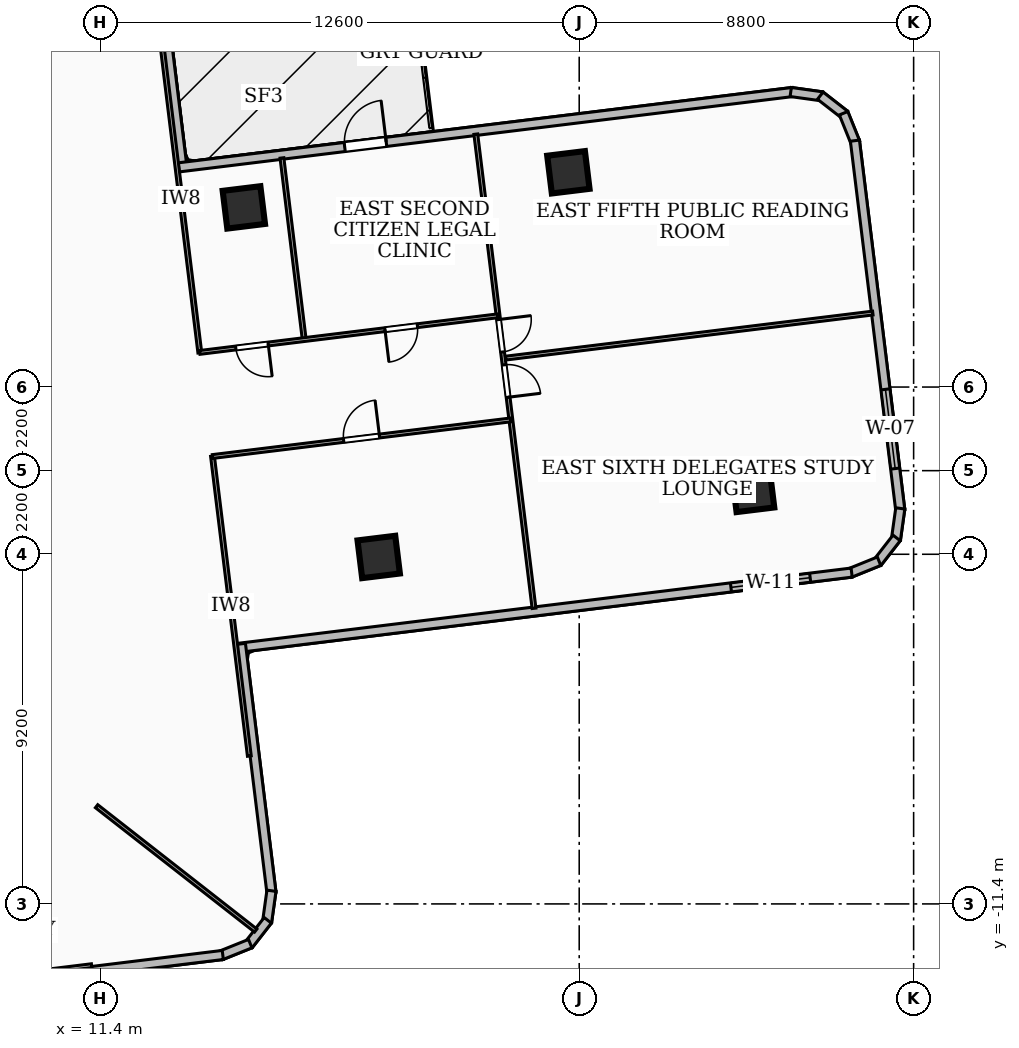
"""IFC4 building model, lengths in metres.
Left out: names, types, materials, properties, quantities, classifications, styles, units other than length and angle.
Written with IfcOpenShell. Run it as: python <this file> out.ifc"""

import sys

from ifc_helpers import new_model, si_unit, direction, frame, frame_2d, origin, origin_2d, place, context, subcontext, project, spatial, rectangle, extrude, element, fill, save


model = new_model("IFC4")
c1 = context("Model", 3, precision=1e-05, world=origin(), true_north=direction((0.0, 1.0)))
c2 = subcontext(c1, "Body", "Model", "MODEL_VIEW")
j1 = project(units=[si_unit("LENGTHUNIT", "METRE"), si_unit("PLANEANGLEUNIT", "RADIAN")], contexts=[c1])
p1 = place(None, origin())
s1 = spatial("IfcSite", under=j1, at=p1, CompositionType="ELEMENT")
p2 = place(p1, origin())
s2 = spatial("IfcBuilding", under=s1, at=p2, CompositionType="ELEMENT")
p3 = place(p2, frame((0.0, 0.0, 82.08)))
s3 = spatial("IfcBuildingStorey", under=s2, at=p3, CompositionType="ELEMENT", Elevation=82.08)
for number, where, z_axis, x_axis in (
    (1, (18.724, -2.271, 0.0), (0.0, 0.0, 1.0), (0.993, 0.122, 0.0)),
    (2, (15.175, 6.927, 0.0), (0.0, 0.0, 1.0), (0.993, 0.122, 0.0)),
    (3, (28.576, -0.533, 0.0), (0.0, 0.0, 1.0), (0.993, 0.122, 0.0)),
    (4, (23.715, 7.851, 0.0), (0.0, 0.0, 1.0), (0.993, 0.122, 0.0)),
):
    element("IfcColumn", number, at=place(p3, frame(where, z_axis=z_axis, x_axis=x_axis)), inside=s3, PredefinedType="COLUMN", context=c2, shape_type="SweptSolid", body=[
        extrude(rectangle(XDim=1.0, YDim=1.0, at=origin_2d()), origin(), (0.0, 0.0, 1.0), 3.6),
    ])
p4 = place(p3, frame((12.743, 14.621, 0.0), z_axis=(0.0, 0.0, 1.0), x_axis=(0.121949848087, -0.992536263595, 0.0)))
e5 = element("IfcWall", 5, at=p4, inside=s3, PredefinedType="SOLIDWALL", context=c2, shape_type="SweptSolid", body=[
    extrude(rectangle(XDim=6.775, YDim=0.24, at=frame_2d((3.387, 0.0))), origin(), (0.0, 0.0, 1.0), 3.34),
])
p5 = place(p3, frame((13.462, 7.98, 0.0), z_axis=(0.0, 0.0, 1.0), x_axis=(0.992550299081, 0.121835560463, 0.0)))
e6 = element("IfcWall", 6, at=p5, inside=s3, PredefinedType="SOLIDWALL", context=c2, shape_type="SweptSolid", body=[
    extrude(rectangle(XDim=16.275, YDim=0.24, at=frame_2d((8.138, 0.0))), origin(), (0.0, 0.0, 1.0), 3.34),
])
p6 = place(p5, frame((4.4, 0.0, 0.0)))
e7 = element("IfcOpeningElement", 7, at=p6, cuts=e6, PredefinedType="OPENING", context=c2, shape_type="SweptSolid", body=[
    extrude(rectangle(XDim=1.1, YDim=2.1, at=frame_2d((0.55, 1.05))), frame((0.0, 0.13, 0.0), z_axis=(0.0, -1.0, 0.0), x_axis=(1.0, 0.0, 0.0)), (0.0, 0.0, 1.0), 0.26),
])
p7 = place(p3, frame((29.566, 9.963, 0.0), z_axis=(0.0, 0.0, 1.0), x_axis=(0.990579937989, -0.136935701899, 0.0)))
e8 = element("IfcWall", 8, at=p7, inside=s3, PredefinedType="SOLIDWALL", context=c2, shape_type="SweptSolid", body=[
    extrude(rectangle(XDim=0.831, YDim=0.24, at=frame_2d((0.416, 0.0))), origin(), (0.0, 0.0, 1.0), 3.34),
])
p8 = place(p3, frame((30.344, 9.867, 0.0), z_axis=(0.0, 0.0, 1.0), x_axis=(0.788996702001, -0.614397431824, 0.0)))
e9 = element("IfcWall", 9, at=p8, inside=s3, PredefinedType="SOLIDWALL", context=c2, shape_type="SweptSolid", body=[
    extrude(rectangle(XDim=0.814, YDim=0.24, at=frame_2d((0.407, 0.0))), origin(), (0.0, 0.0, 1.0), 3.34),
])
p9 = place(p3, frame((30.957, 9.405, 0.0), z_axis=(0.0, 0.0, 1.0), x_axis=(0.373519459995, -0.927622343955, 0.0)))
e10 = element("IfcWall", 10, at=p9, inside=s3, PredefinedType="SOLIDWALL", context=c2, shape_type="SweptSolid", body=[
    extrude(rectangle(XDim=0.83, YDim=0.24, at=frame_2d((0.415, 0.0))), origin(), (0.0, 0.0, 1.0), 3.34),
])
p10 = place(p3, frame((31.255, 8.683, 0.0), z_axis=(0.0, 0.0, 1.0), x_axis=(0.12185728374, -0.992547632308, 0.0)))
e11 = element("IfcWall", 11, at=p10, inside=s3, PredefinedType="SOLIDWALL", context=c2, shape_type="SweptSolid", body=[
    extrude(rectangle(XDim=9.799, YDim=0.24, at=frame_2d((4.899, 0.0))), origin(), (0.0, 0.0, 1.0), 3.34),
])
p11 = place(p10, frame((6.593, 0.0, 0.85)))
e12 = element("IfcOpeningElement", 12, at=p11, cuts=e11, PredefinedType="OPENING", context=c2, shape_type="SweptSolid", body=[
    extrude(rectangle(XDim=2.1, YDim=1.8, at=frame_2d((1.05, 0.9))), frame((0.0, 0.13, 0.0), z_axis=(0.0, -1.0, 0.0), x_axis=(1.0, 0.0, 0.0)), (0.0, 0.0, 1.0), 0.26),
])
p12 = place(p3, frame((32.449, -0.993, 0.0), z_axis=(0.0, 0.0, 1.0), x_axis=(-0.138538220487, -0.990357087855, 0.0)))
e13 = element("IfcWall", 13, at=p12, inside=s3, PredefinedType="SOLIDWALL", context=c2, shape_type="SweptSolid", body=[
    extrude(rectangle(XDim=0.83, YDim=0.24, at=frame_2d((0.415, 0.0))), origin(), (0.0, 0.0, 1.0), 3.34),
])
p13 = place(p3, frame((32.352, -1.77, 0.0), z_axis=(0.0, 0.0, 1.0), x_axis=(-0.614397431824, -0.788996702001, 0.0)))
e14 = element("IfcWall", 14, at=p13, inside=s3, PredefinedType="SOLIDWALL", context=c2, shape_type="SweptSolid", body=[
    extrude(rectangle(XDim=0.814, YDim=0.24, at=frame_2d((0.407, 0.0))), origin(), (0.0, 0.0, 1.0), 3.34),
])
p14 = place(p3, frame((31.89, -2.383, 0.0), z_axis=(0.0, 0.0, 1.0), x_axis=(-0.927007742151, -0.375042192283, 0.0)))
e15 = element("IfcWall", 15, at=p14, inside=s3, PredefinedType="SOLIDWALL", context=c2, shape_type="SweptSolid", body=[
    extrude(rectangle(XDim=0.829, YDim=0.24, at=frame_2d((0.415, 0.0))), origin(), (0.0, 0.0, 1.0), 3.34),
])
p15 = place(p3, frame((31.169, -2.682, 0.0), z_axis=(0.0, 0.0, 1.0), x_axis=(-0.992548484973, -0.121850338438, 0.0)))
e16 = element("IfcWall", 16, at=p15, inside=s3, PredefinedType="SOLIDWALL", context=c2, shape_type="SweptSolid", body=[
    extrude(rectangle(XDim=16.275, YDim=0.24, at=frame_2d((8.138, 0.0))), origin(), (0.0, 0.0, 1.0), 3.34),
])
p16 = place(p15, frame((1.1, 0.0, 0.85)))
e17 = element("IfcOpeningElement", 17, at=p16, cuts=e16, PredefinedType="OPENING", context=c2, shape_type="SweptSolid", body=[
    extrude(rectangle(XDim=2.1, YDim=1.6, at=frame_2d((1.05, 0.8))), frame((0.0, 0.13, 0.0), z_axis=(0.0, -1.0, 0.0), x_axis=(1.0, 0.0, 0.0)), (0.0, 0.0, 1.0), 0.26),
])
p17 = place(p3, frame((15.098, -4.558, 0.0), z_axis=(0.0, 0.0, 1.0), x_axis=(0.121938646341, -0.992537639855, 0.0)))
e18 = element("IfcWall", 18, at=p17, inside=s3, PredefinedType="SOLIDWALL", context=c2, shape_type="SweptSolid", body=[
    extrude(rectangle(XDim=6.595, YDim=0.24, at=frame_2d((3.298, 0.0))), origin(), (0.0, 0.0, 1.0), 3.34),
])
p18 = place(p3, frame((15.902, -11.054, 0.0), z_axis=(0.0, 0.0, 1.0), x_axis=(-0.138376981782, -0.990379629694, 0.0)))
e19 = element("IfcWall", 19, at=p18, inside=s3, PredefinedType="SOLIDWALL", context=c2, shape_type="SweptSolid", body=[
    extrude(rectangle(XDim=0.831, YDim=0.24, at=frame_2d((0.416, 0.0))), origin(), (0.0, 0.0, 1.0), 3.34),
])
p19 = place(p3, frame((15.805, -11.832, 0.0), z_axis=(0.0, 0.0, 1.0), x_axis=(-0.614397431824, -0.788996702001, 0.0)))
e20 = element("IfcWall", 20, at=p19, inside=s3, PredefinedType="SOLIDWALL", context=c2, shape_type="SweptSolid", body=[
    extrude(rectangle(XDim=0.814, YDim=0.24, at=frame_2d((0.407, 0.0))), origin(), (0.0, 0.0, 1.0), 3.34),
])
p20 = place(p3, frame((15.343, -12.445, 0.0), z_axis=(0.0, 0.0, 1.0), x_axis=(-0.927724225254, -0.37326634174, 0.0)))
e21 = element("IfcWall", 21, at=p20, inside=s3, PredefinedType="SOLIDWALL", context=c2, shape_type="SweptSolid", body=[
    extrude(rectangle(XDim=0.83, YDim=0.24, at=frame_2d((0.415, 0.0))), origin(), (0.0, 0.0, 1.0), 3.34),
])
p21 = place(p3, frame((14.621, -12.743, 0.0), z_axis=(0.0, 0.0, 1.0), x_axis=(-0.992536263595, -0.121949848087, 0.0)))
e22 = element("IfcWall", 22, at=p21, inside=s3, PredefinedType="SOLIDWALL", context=c2, shape_type="SweptSolid", body=[
    extrude(rectangle(XDim=6.775, YDim=0.24, at=frame_2d((3.387, 0.0))), origin(), (0.0, 0.0, 1.0), 3.34),
])
p22 = place(p3, frame((8.11, 10.38, 0.0), z_axis=(0.0, 0.0, 1.0), x_axis=(0.615665236773, 0.788007814828, 0.0)))
e23 = element("IfcWall", 23, at=p22, inside=s3, PredefinedType="PARTITIONING", context=c2, shape_type="SweptSolid", body=[
    extrude(rectangle(XDim=6.482, YDim=0.1, at=frame_2d((3.241, 0.0))), origin(), (0.0, 0.0, 1.0), 3.34),
])
p23 = place(p3, frame((11.3, -8.829, 0.0), z_axis=(0.0, 0.0, 1.0), x_axis=(0.788014623364, -0.61565652223, 0.0)))
e24 = element("IfcWall", 24, at=p23, inside=s3, PredefinedType="PARTITIONING", context=c2, shape_type="SweptSolid", body=[
    extrude(rectangle(XDim=5.315, YDim=0.1, at=frame_2d((2.657, 0.0))), origin(), (0.0, 0.0, 1.0), 3.34),
])
p24 = place(p3, frame((14.017, 3.101, 0.0), z_axis=(0.0, 0.0, 1.0), x_axis=(-0.122045971517, 0.992524448483, 0.0)))
e25 = element("IfcWall", 25, at=p24, inside=s3, PredefinedType="PARTITIONING", context=c2, shape_type="SweptSolid", body=[
    extrude(rectangle(XDim=8.13, YDim=0.1, at=frame_2d((4.065, 0.0))), origin(), (0.0, 0.0, 1.0), 2.486),
])
p25 = place(p3, frame((15.32, -7.509, 0.0), z_axis=(0.0, 0.0, 1.0), x_axis=(-0.122001160868, 0.992529957607, 0.0)))
e26 = element("IfcWall", 26, at=p25, inside=s3, PredefinedType="PARTITIONING", context=c2, shape_type="SweptSolid", body=[
    extrude(rectangle(XDim=7.95, YDim=0.1, at=frame_2d((3.975, 0.0))), origin(), (0.0, 0.0, 1.0), 2.486),
])
p26 = place(p3, frame((16.762, 3.469, 0.0), z_axis=(0.0, 0.0, 1.0), x_axis=(-0.121797137196, 0.992555014783, 0.0)))
e27 = element("IfcWall", 27, at=p26, inside=s3, PredefinedType="PARTITIONING", context=c2, shape_type="SweptSolid", body=[
    extrude(rectangle(XDim=4.795, YDim=0.1, at=frame_2d((2.397, 0.0))), origin(), (0.0, 0.0, 1.0), 2.486),
])
p27 = place(p3, frame((21.866, 4.075, 0.0), z_axis=(0.0, 0.0, 1.0), x_axis=(-0.992548040298, -0.121853960542, 0.0)))
e28 = element("IfcWall", 28, at=p27, inside=s3, PredefinedType="PARTITIONING", context=c2, shape_type="SweptSolid", body=[
    extrude(rectangle(XDim=7.91, YDim=0.1, at=frame_2d((3.955, 0.0))), origin(), (0.0, 0.0, 1.0), 3.34),
])
p28 = place(p27, frame((6.095, 0.0, 0.0)))
e29 = element("IfcOpeningElement", 29, at=p28, cuts=e28, PredefinedType="OPENING", context=c2, shape_type="SweptSolid", body=[
    extrude(rectangle(XDim=0.86, YDim=2.04, at=frame_2d((0.43, 1.02))), frame((0.0, 0.06, 0.0), z_axis=(0.0, -1.0, 0.0), x_axis=(1.0, 0.0, 0.0)), (0.0, 0.0, 1.0), 0.12),
])
p29 = place(p27, frame((2.14, 0.0, 0.0)))
e30 = element("IfcOpeningElement", 30, at=p29, cuts=e28, PredefinedType="OPENING", context=c2, shape_type="SweptSolid", body=[
    extrude(rectangle(XDim=0.86, YDim=2.04, at=frame_2d((0.43, 1.02))), frame((0.0, 0.06, 0.0), z_axis=(0.0, -1.0, 0.0), x_axis=(1.0, 0.0, 0.0)), (0.0, 0.0, 1.0), 0.12),
])
p30 = place(p3, frame((14.352, 0.372, 0.0), z_axis=(0.0, 0.0, 1.0), x_axis=(0.992547581986, 0.121857693618, 0.0)))
e31 = element("IfcWall", 31, at=p30, inside=s3, PredefinedType="PARTITIONING", context=c2, shape_type="SweptSolid", body=[
    extrude(rectangle(XDim=7.91, YDim=0.1, at=frame_2d((3.955, 0.0))), origin(), (0.0, 0.0, 1.0), 3.34),
])
p31 = place(p30, frame((3.475, 0.0, 0.0)))
e32 = element("IfcOpeningElement", 32, at=p31, cuts=e31, PredefinedType="OPENING", context=c2, shape_type="SweptSolid", body=[
    extrude(rectangle(XDim=0.95, YDim=2.08, at=frame_2d((0.475, 1.04))), frame((0.0, 0.06, 0.0), z_axis=(0.0, -1.0, 0.0), x_axis=(1.0, 0.0, 0.0)), (0.0, 0.0, 1.0), 0.12),
])
p32 = place(p3, frame((22.064, 2.961, 0.0), z_axis=(0.0, 0.0, 1.0), x_axis=(0.992550160931, 0.121836685916, 0.0)))
e33 = element("IfcWall", 33, at=p32, inside=s3, PredefinedType="PARTITIONING", context=c2, shape_type="SweptSolid", body=[
    extrude(rectangle(XDim=9.735, YDim=0.1, at=frame_2d((4.867, 0.0))), origin(), (0.0, 0.0, 1.0), 2.793),
])
p33 = place(p3, frame((21.279, 8.854, 0.0), z_axis=(0.0, 0.0, 1.0), x_axis=(0.121878209661, -0.992545062962, 0.0)))
e34 = element("IfcWall", 34, at=p33, inside=s3, PredefinedType="PARTITIONING", context=c2, shape_type="SweptSolid", body=[
    extrude(rectangle(XDim=12.57, YDim=0.1, at=frame_2d((6.285, 0.0))), origin(), (0.0, 0.0, 1.0), 2.486),
])
p34 = place(p33, frame((6.115, 0.0, 0.0)))
e35 = element("IfcOpeningElement", 35, at=p34, cuts=e34, PredefinedType="OPENING", context=c2, shape_type="SweptSolid", body=[
    extrude(rectangle(XDim=0.86, YDim=2.04, at=frame_2d((0.43, 1.02))), frame((0.0, 0.06, 0.0), z_axis=(0.0, -1.0, 0.0), x_axis=(1.0, 0.0, 0.0)), (0.0, 0.0, 1.0), 0.12),
])
p35 = place(p33, frame((4.915, 0.0, 0.0)))
e36 = element("IfcOpeningElement", 36, at=p35, cuts=e34, PredefinedType="OPENING", context=c2, shape_type="SweptSolid", body=[
    extrude(rectangle(XDim=0.86, YDim=2.04, at=frame_2d((0.43, 1.02))), frame((0.0, 0.06, 0.0), z_axis=(0.0, -1.0, 0.0), x_axis=(1.0, 0.0, 0.0)), (0.0, 0.0, 1.0), 0.12),
])
p36 = place(p3, frame((3.101, -14.017, 0.0), z_axis=(0.0, 0.0, 1.0), x_axis=(0.992524448483, 0.122045971517, 0.0)))
e37 = element("IfcWall", 37, at=p36, inside=s3, PredefinedType="PARTITIONING", context=c2, shape_type="SweptSolid", body=[
    extrude(rectangle(XDim=8.13, YDim=0.1, at=frame_2d((4.065, 0.0))), origin(), (0.0, 0.0, 1.0), 2.486),
])
p37 = place(p6, origin())
e38 = element("IfcDoor", 38, at=p37, inside=s3, OperationType="SINGLE_SWING_RIGHT", PredefinedType="DOOR", context=c2, shape_type="SweptSolid", body=[
    extrude(rectangle(XDim=1.1, YDim=2.1, at=frame_2d((0.55, 1.05))), frame((0.0, 0.025, 0.0), z_axis=(0.0, -1.0, 0.0), x_axis=(1.0, 0.0, 0.0)), (0.0, 0.0, 1.0), 0.05),
])
fill(e7, e38)
p38 = place(p11, origin())
e39 = element("IfcWindow", 39, at=p38, inside=s3, PartitioningType="SINGLE_PANEL", PredefinedType="WINDOW", context=c2, shape_type="SweptSolid", body=[
    extrude(rectangle(XDim=2.1, YDim=1.8, at=frame_2d((1.05, 0.9))), frame((0.0, 0.03, 0.0), z_axis=(0.0, -1.0, 0.0), x_axis=(1.0, 0.0, 0.0)), (0.0, 0.0, 1.0), 0.06),
])
fill(e12, e39)
p39 = place(p16, origin())
e40 = element("IfcWindow", 40, at=p39, inside=s3, PartitioningType="SINGLE_PANEL", PredefinedType="WINDOW", context=c2, shape_type="SweptSolid", body=[
    extrude(rectangle(XDim=2.1, YDim=1.6, at=frame_2d((1.05, 0.8))), frame((0.0, 0.03, 0.0), z_axis=(0.0, -1.0, 0.0), x_axis=(1.0, 0.0, 0.0)), (0.0, 0.0, 1.0), 0.06),
])
fill(e17, e40)
p40 = place(p28, origin())
e41 = element("IfcDoor", 41, at=p40, inside=s3, OperationType="SINGLE_SWING_LEFT", PredefinedType="DOOR", context=c2, shape_type="SweptSolid", body=[
    extrude(rectangle(XDim=0.86, YDim=2.04, at=frame_2d((0.43, 1.02))), frame((0.0, 0.025, 0.0), z_axis=(0.0, -1.0, 0.0), x_axis=(1.0, 0.0, 0.0)), (0.0, 0.0, 1.0), 0.05),
])
fill(e29, e41)
p41 = place(p29, origin())
e42 = element("IfcDoor", 42, at=p41, inside=s3, OperationType="SINGLE_SWING_RIGHT", PredefinedType="DOOR", context=c2, shape_type="SweptSolid", body=[
    extrude(rectangle(XDim=0.86, YDim=2.04, at=frame_2d((0.43, 1.02))), frame((0.0, 0.025, 0.0), z_axis=(0.0, -1.0, 0.0), x_axis=(1.0, 0.0, 0.0)), (0.0, 0.0, 1.0), 0.05),
])
fill(e30, e42)
p42 = place(p31, origin())
e43 = element("IfcDoor", 43, at=p42, inside=s3, OperationType="SINGLE_SWING_RIGHT", PredefinedType="DOOR", context=c2, shape_type="SweptSolid", body=[
    extrude(rectangle(XDim=0.95, YDim=2.08, at=frame_2d((0.475, 1.04))), frame((0.0, 0.025, 0.0), z_axis=(0.0, -1.0, 0.0), x_axis=(1.0, 0.0, 0.0)), (0.0, 0.0, 1.0), 0.05),
])
fill(e32, e43)
p43 = place(p34, origin())
e44 = element("IfcDoor", 44, at=p43, inside=s3, OperationType="SINGLE_SWING_RIGHT", PredefinedType="DOOR", context=c2, shape_type="SweptSolid", body=[
    extrude(rectangle(XDim=0.86, YDim=2.04, at=frame_2d((0.43, 1.02))), frame((0.0, 0.025, 0.0), z_axis=(0.0, -1.0, 0.0), x_axis=(1.0, 0.0, 0.0)), (0.0, 0.0, 1.0), 0.05),
])
fill(e35, e44)
p44 = place(p35, origin())
e45 = element("IfcDoor", 45, at=p44, inside=s3, OperationType="SINGLE_SWING_LEFT", PredefinedType="DOOR", context=c2, shape_type="SweptSolid", body=[
    extrude(rectangle(XDim=0.86, YDim=2.04, at=frame_2d((0.43, 1.02))), frame((0.0, 0.025, 0.0), z_axis=(0.0, -1.0, 0.0), x_axis=(1.0, 0.0, 0.0)), (0.0, 0.0, 1.0), 0.05),
])
fill(e36, e45)
save(model, sys.argv[1])
